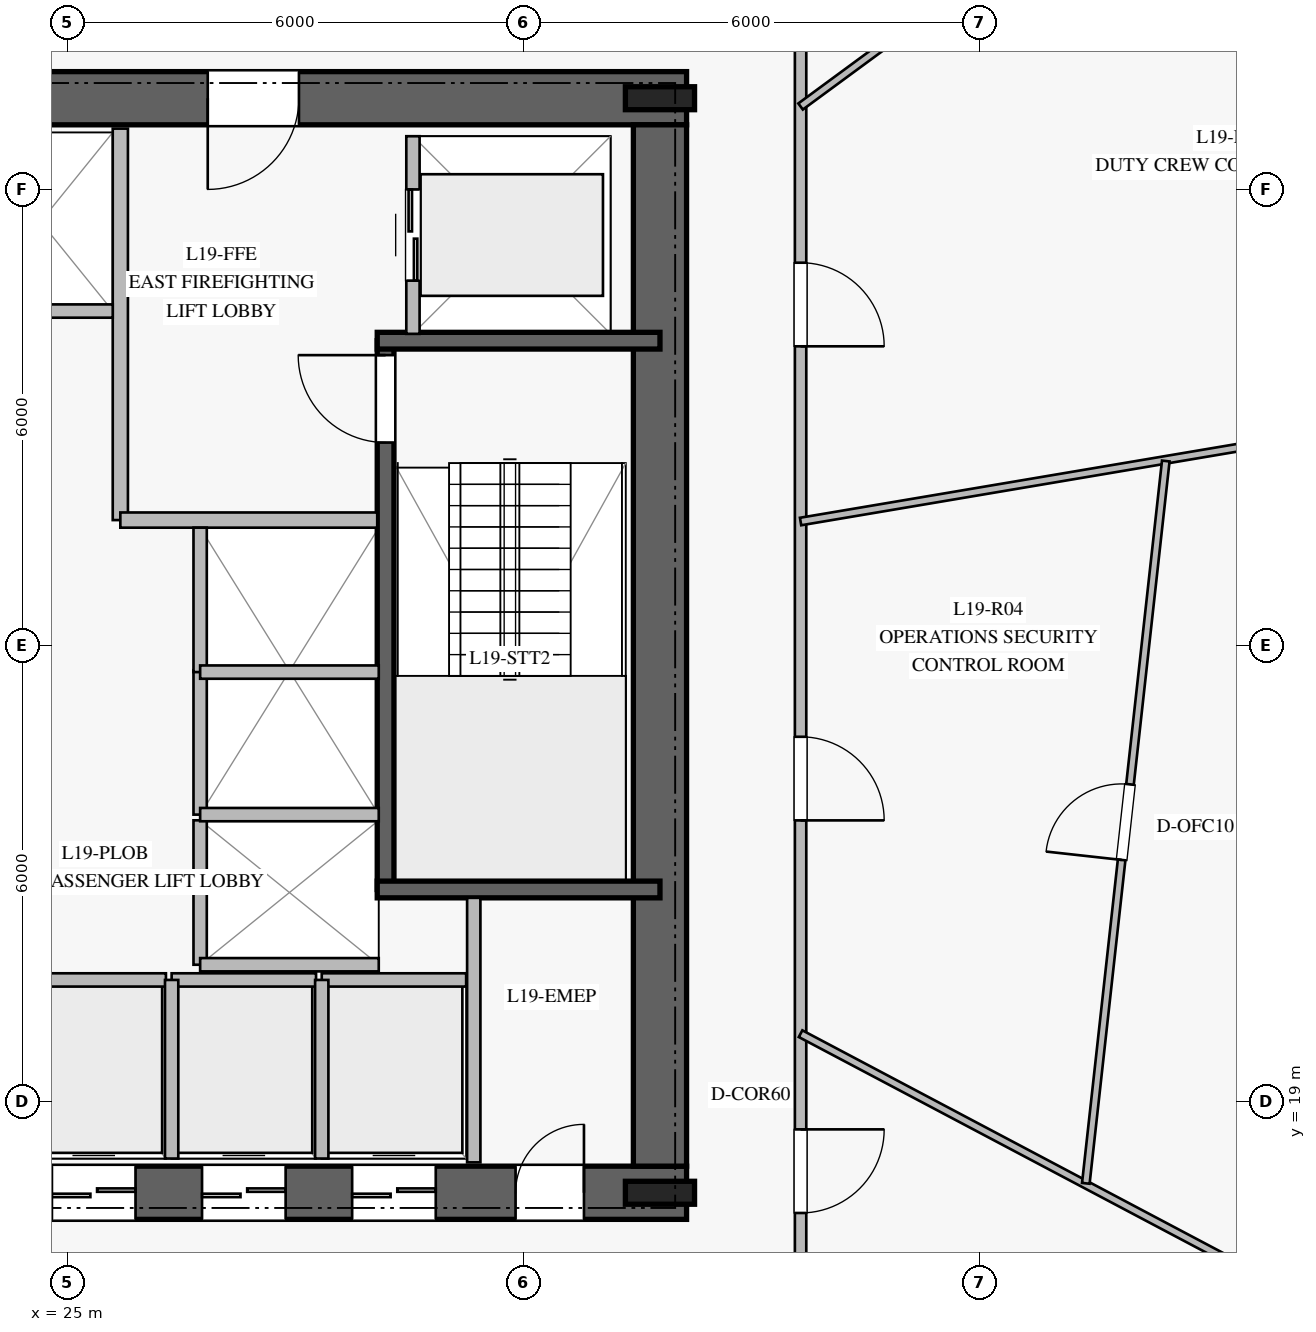
"""IFC4 building model, lengths in metres.
Left out: names, types, materials, properties, quantities, classifications, styles, units other than length and angle.
Written with IfcOpenShell. Run it as: python <this file> out.ifc"""

import sys

from ifc_helpers import new_model, si_unit, direction, frame, frame_2d, origin, origin_2d, place, context, subcontext, project, spatial, rectangle, i_section, extrude, element, fill, save


model = new_model("IFC4")
c1 = context("Model", 3, precision=1e-05, world=origin(), true_north=direction((0.0, 1.0)))
c2 = subcontext(c1, "Body", "Model", "MODEL_VIEW")
j1 = project(units=[si_unit("LENGTHUNIT", "METRE"), si_unit("PLANEANGLEUNIT", "RADIAN")], contexts=[c1])
p1 = place(None, origin())
s1 = spatial("IfcSite", under=j1, at=p1, CompositionType="ELEMENT")
p2 = place(p1, origin())
s2 = spatial("IfcBuilding", under=s1, at=p2, CompositionType="ELEMENT")
p3 = place(p2, frame((0.0, 0.0, 80.0)))
s3 = spatial("IfcBuildingStorey", under=s2, at=p3, CompositionType="ELEMENT", Elevation=80.0)
p4 = place(p3, frame((16.85, 17.8, 0.0), z_axis=(0.0, 0.0, 1.0), x_axis=(1.0, 0.0, 0.0)))
e1 = element("IfcWall", 1, at=p4, inside=s3, PredefinedType="SHEAR", context=c2, shape_type="SweptSolid", body=[
    extrude(rectangle(XDim=16.3, YDim=0.7, at=frame_2d((8.15, 0.0))), origin(), (0.0, 0.0, 1.0), 3.76),
])
p5 = place(p4, frame((5.1, 0.0, 0.0)))
e2 = element("IfcOpeningElement", 2, at=p5, cuts=e1, PredefinedType="OPENING", context=c2, shape_type="SweptSolid", body=[
    extrude(rectangle(XDim=1.2, YDim=2.25, at=frame_2d((0.6, 1.125))), frame((0.0, 0.36, 0.0), z_axis=(0.0, -1.0, 0.0), x_axis=(1.0, 0.0, 0.0)), (0.0, 0.0, 1.0), 0.72),
])
p6 = place(p4, frame((14.05, 0.0, 0.0)))
e3 = element("IfcOpeningElement", 3, at=p6, cuts=e1, PredefinedType="OPENING", context=c2, shape_type="SweptSolid", body=[
    extrude(rectangle(XDim=0.9, YDim=2.1, at=frame_2d((0.45, 1.05))), frame((0.0, 0.36, 0.0), z_axis=(0.0, -1.0, 0.0), x_axis=(1.0, 0.0, 0.0)), (0.0, 0.0, 1.0), 0.72),
])
p7 = place(p4, frame((7.95, 0.0, 0.0)))
e4 = element("IfcOpeningElement", 4, at=p7, cuts=e1, PredefinedType="OPENING", context=c2, shape_type="SweptSolid", body=[
    extrude(rectangle(XDim=1.1, YDim=2.2, at=frame_2d((0.55, 1.1))), frame((0.0, 0.36, 0.0), z_axis=(0.0, -1.0, 0.0), x_axis=(1.0, 0.0, 0.0)), (0.0, 0.0, 1.0), 0.72),
])
p8 = place(p4, frame((9.925, 0.0, 0.0)))
e5 = element("IfcOpeningElement", 5, at=p8, cuts=e1, PredefinedType="OPENING", context=c2, shape_type="SweptSolid", body=[
    extrude(rectangle(XDim=1.1, YDim=2.2, at=frame_2d((0.55, 1.1))), frame((0.0, 0.36, 0.0), z_axis=(0.0, -1.0, 0.0), x_axis=(1.0, 0.0, 0.0)), (0.0, 0.0, 1.0), 0.72),
])
p9 = place(p4, frame((11.9, 0.0, 0.0)))
e6 = element("IfcOpeningElement", 6, at=p9, cuts=e1, PredefinedType="OPENING", context=c2, shape_type="SweptSolid", body=[
    extrude(rectangle(XDim=1.1, YDim=2.2, at=frame_2d((0.55, 1.1))), frame((0.0, 0.36, 0.0), z_axis=(0.0, -1.0, 0.0), x_axis=(1.0, 0.0, 0.0)), (0.0, 0.0, 1.0), 0.72),
])
p10 = place(p3, frame((33.15, 32.2, 0.0), z_axis=(0.0, 0.0, 1.0), x_axis=(-1.0, 0.0, 0.0)))
e7 = element("IfcWall", 7, at=p10, inside=s3, PredefinedType="SHEAR", context=c2, shape_type="SweptSolid", body=[
    extrude(rectangle(XDim=16.3, YDim=0.7, at=frame_2d((8.15, 0.0))), origin(), (0.0, 0.0, 1.0), 3.76),
])
p11 = place(p10, frame((5.1, 0.0, 0.0)))
e8 = element("IfcOpeningElement", 8, at=p11, cuts=e7, PredefinedType="OPENING", context=c2, shape_type="SweptSolid", body=[
    extrude(rectangle(XDim=1.2, YDim=2.25, at=frame_2d((0.6, 1.125))), frame((0.0, 0.36, 0.0), z_axis=(0.0, -1.0, 0.0), x_axis=(1.0, 0.0, 0.0)), (0.0, 0.0, 1.0), 0.72),
])
p12 = place(p3, frame((32.8, 18.15, 0.0), z_axis=(0.0, 0.0, 1.0), x_axis=(0.0, 1.0, 0.0)))
e9 = element("IfcWall", 9, at=p12, inside=s3, PredefinedType="SHEAR", context=c2, shape_type="SweptSolid", body=[
    extrude(rectangle(XDim=13.7, YDim=0.7, at=frame_2d((6.85, 0.0))), origin(), (0.0, 0.0, 1.0), 3.76),
])
for number, where, z_axis, x_axis in (
    (10, (32.8, 17.8, 0.0), (0.0, 0.0, 1.0), (1.0, 0.0, 0.0)),
    (11, (32.8, 32.2, 0.0), (0.0, 0.0, 1.0), (1.0, 0.0, 0.0)),
):
    element("IfcColumn", number, at=place(p3, frame(where, z_axis=z_axis, x_axis=x_axis)), inside=s3, PredefinedType="COLUMN", context=c2, shape_type="SweptSolid", body=[
        extrude(i_section(OverallWidth=0.302, OverallDepth=0.91, WebThickness=0.021, FlangeThickness=0.04, at=origin_2d()), origin(), (0.0, 0.0, 1.0), 4.0),
    ])
p13 = place(p3, frame((29.19, 21.79, 0.0), z_axis=(0.0, 0.0, 1.0), x_axis=(0.0, 1.0, 0.0)))
e12 = element("IfcWall", 12, at=p13, inside=s3, PredefinedType="SOLIDWALL", context=c2, shape_type="SweptSolid", body=[
    extrude(rectangle(XDim=7.22, YDim=0.22, at=frame_2d((3.61, 0.0))), origin(), (0.0, 0.0, 1.0), 3.76),
])
p14 = place(p13, frame((5.88, 0.0, 0.0)))
e13 = element("IfcOpeningElement", 13, at=p14, cuts=e12, PredefinedType="OPENING", context=c2, shape_type="SweptSolid", body=[
    extrude(rectangle(XDim=1.15, YDim=2.2, at=frame_2d((0.575, 1.1))), frame((0.0, 0.12, 0.0), z_axis=(0.0, -1.0, 0.0), x_axis=(1.0, 0.0, 0.0)), (0.0, 0.0, 1.0), 0.24),
])
for number, where, z_axis, x_axis in (
    (14, (29.08, 21.79, 0.0), (0.0, 0.0, 1.0), (1.0, 0.0, 0.0)),
    (15, (29.08, 29.01, 0.0), (0.0, 0.0, 1.0), (1.0, 0.0, 0.0)),
):
    element("IfcWall", number, at=place(p3, frame(where, z_axis=z_axis, x_axis=x_axis)), inside=s3, PredefinedType="SOLIDWALL", context=c2, shape_type="SweptSolid", body=[
        extrude(rectangle(XDim=3.72, YDim=0.22, at=frame_2d((1.86, 0.0))), origin(), (0.0, 0.0, 1.0), 3.76),
    ])
p15 = place(p3, frame((25.7, 26.65, 0.0), z_axis=(0.0, 0.0, 1.0), x_axis=(0.0, 1.0, 0.0)))
e16 = element("IfcWall", 16, at=p15, inside=s3, PredefinedType="PARTITIONING", context=c2, shape_type="SweptSolid", body=[
    extrude(rectangle(XDim=5.15, YDim=0.2, at=frame_2d((2.575, 0.0))), origin(), (0.0, 0.0, 1.0), 3.76),
])
p16 = place(p3, frame((25.7, 26.65, 0.0), z_axis=(0.0, 0.0, 1.0), x_axis=(1.0, 0.0, 0.0)))
e17 = element("IfcWall", 17, at=p16, inside=s3, PredefinedType="PARTITIONING", context=c2, shape_type="SweptSolid", body=[
    extrude(rectangle(XDim=3.38, YDim=0.2, at=frame_2d((1.69, 0.0))), origin(), (0.0, 0.0, 1.0), 3.76),
])
p17 = place(p3, frame((30.35, 18.2, 0.0), z_axis=(0.0, 0.0, 1.0), x_axis=(0.0, 1.0, 0.0)))
e18 = element("IfcWall", 18, at=p17, inside=s3, PredefinedType="PARTITIONING", context=c2, shape_type="SweptSolid", body=[
    extrude(rectangle(XDim=3.48, YDim=0.175, at=frame_2d((1.74, 0.0))), origin(), (0.0, 0.0, 1.0), 3.76),
])
p18 = place(p3, frame((24.4, 20.6, 0.0), z_axis=(0.0, 0.0, 1.0), x_axis=(1.0, 0.0, 0.0)))
e19 = element("IfcWall", 19, at=p18, inside=s3, PredefinedType="PARTITIONING", context=c2, shape_type="SweptSolid", body=[
    extrude(rectangle(XDim=1.9, YDim=0.175, at=frame_2d((0.95, 0.0))), origin(), (0.0, 0.0, 1.0), 3.76),
])
p19 = place(p3, frame((26.375, 20.6, 0.0), z_axis=(0.0, 0.0, 1.0), x_axis=(1.0, 0.0, 0.0)))
e20 = element("IfcWall", 20, at=p19, inside=s3, PredefinedType="PARTITIONING", context=c2, shape_type="SweptSolid", body=[
    extrude(rectangle(XDim=1.9, YDim=0.175, at=frame_2d((0.95, 0.0))), origin(), (0.0, 0.0, 1.0), 3.76),
])
p20 = place(p3, frame((26.375, 18.25, 0.0), z_axis=(0.0, 0.0, 1.0), x_axis=(0.0, 1.0, 0.0)))
e21 = element("IfcWall", 21, at=p20, inside=s3, PredefinedType="PARTITIONING", context=c2, shape_type="SweptSolid", body=[
    extrude(rectangle(XDim=2.35, YDim=0.175, at=frame_2d((1.175, 0.0))), origin(), (0.0, 0.0, 1.0), 3.76),
])
p21 = place(p3, frame((28.35, 20.6, 0.0), z_axis=(0.0, 0.0, 1.0), x_axis=(1.0, 0.0, 0.0)))
e22 = element("IfcWall", 22, at=p21, inside=s3, PredefinedType="PARTITIONING", context=c2, shape_type="SweptSolid", body=[
    extrude(rectangle(XDim=1.9, YDim=0.175, at=frame_2d((0.95, 0.0))), origin(), (0.0, 0.0, 1.0), 3.76),
])
p22 = place(p3, frame((28.35, 18.25, 0.0), z_axis=(0.0, 0.0, 1.0), x_axis=(0.0, 1.0, 0.0)))
e23 = element("IfcWall", 23, at=p22, inside=s3, PredefinedType="PARTITIONING", context=c2, shape_type="SweptSolid", body=[
    extrude(rectangle(XDim=2.35, YDim=0.175, at=frame_2d((1.175, 0.0))), origin(), (0.0, 0.0, 1.0), 3.76),
])
p23 = place(p3, frame((23.7, 29.4, 0.0), z_axis=(0.0, 0.0, 1.0), x_axis=(1.0, 0.0, 0.0)))
e24 = element("IfcWall", 24, at=p23, inside=s3, PredefinedType="PARTITIONING", context=c2, shape_type="SweptSolid", body=[
    extrude(rectangle(XDim=1.9, YDim=0.175, at=frame_2d((0.95, 0.0))), origin(), (0.0, 0.0, 1.0), 3.76),
])
p24 = place(p3, frame((26.75, 20.8, 0.0), z_axis=(0.0, 0.0, 1.0), x_axis=(0.0, 1.0, 0.0)))
e25 = element("IfcWall", 25, at=p24, inside=s3, PredefinedType="PARTITIONING", context=c2, shape_type="SweptSolid", body=[
    extrude(rectangle(XDim=1.9, YDim=0.175, at=frame_2d((0.95, 0.0))), origin(), (0.0, 0.0, 1.0), 3.76),
])
p25 = place(p3, frame((26.75, 20.8, 0.0), z_axis=(0.0, 0.0, 1.0), x_axis=(1.0, 0.0, 0.0)))
e26 = element("IfcWall", 26, at=p25, inside=s3, PredefinedType="PARTITIONING", context=c2, shape_type="SweptSolid", body=[
    extrude(rectangle(XDim=2.35, YDim=0.175, at=frame_2d((1.175, 0.0))), origin(), (0.0, 0.0, 1.0), 3.76),
])
p26 = place(p3, frame((26.75, 22.775, 0.0), z_axis=(0.0, 0.0, 1.0), x_axis=(0.0, 1.0, 0.0)))
e27 = element("IfcWall", 27, at=p26, inside=s3, PredefinedType="PARTITIONING", context=c2, shape_type="SweptSolid", body=[
    extrude(rectangle(XDim=1.9, YDim=0.175, at=frame_2d((0.95, 0.0))), origin(), (0.0, 0.0, 1.0), 3.76),
])
p27 = place(p3, frame((26.75, 22.775, 0.0), z_axis=(0.0, 0.0, 1.0), x_axis=(1.0, 0.0, 0.0)))
e28 = element("IfcWall", 28, at=p27, inside=s3, PredefinedType="PARTITIONING", context=c2, shape_type="SweptSolid", body=[
    extrude(rectangle(XDim=2.35, YDim=0.175, at=frame_2d((1.175, 0.0))), origin(), (0.0, 0.0, 1.0), 3.76),
])
p28 = place(p3, frame((26.75, 24.65, 0.0), z_axis=(0.0, 0.0, 1.0), x_axis=(0.0, 1.0, 0.0)))
e29 = element("IfcWall", 29, at=p28, inside=s3, PredefinedType="PARTITIONING", context=c2, shape_type="SweptSolid", body=[
    extrude(rectangle(XDim=1.9, YDim=0.175, at=frame_2d((0.95, 0.0))), origin(), (0.0, 0.0, 1.0), 3.76),
])
p29 = place(p3, frame((26.75, 24.65, 0.0), z_axis=(0.0, 0.0, 1.0), x_axis=(1.0, 0.0, 0.0)))
e30 = element("IfcWall", 30, at=p29, inside=s3, PredefinedType="PARTITIONING", context=c2, shape_type="SweptSolid", body=[
    extrude(rectangle(XDim=2.35, YDim=0.175, at=frame_2d((1.175, 0.0))), origin(), (0.0, 0.0, 1.0), 3.76),
])
p30 = place(p3, frame((29.55, 29.1, 0.0), z_axis=(0.0, 0.0, 1.0), x_axis=(0.0, 1.0, 0.0)))
e31 = element("IfcWall", 31, at=p30, inside=s3, PredefinedType="PARTITIONING", context=c2, shape_type="SweptSolid", body=[
    extrude(rectangle(XDim=2.6, YDim=0.175, at=frame_2d((1.3, 0.0))), origin(), (0.0, 0.0, 1.0), 3.76),
])
p31 = place(p30, frame((0.7, 0.0, 0.0)))
e32 = element("IfcOpeningElement", 32, at=p31, cuts=e31, PredefinedType="OPENING", context=c2, shape_type="SweptSolid", body=[
    extrude(rectangle(XDim=1.2, YDim=2.2, at=frame_2d((0.6, 1.1))), frame((0.0, 0.098, 0.0), z_axis=(0.0, -1.0, 0.0), x_axis=(1.0, 0.0, 0.0)), (0.0, 0.0, 1.0), 0.195),
])
p32 = place(p3, frame((34.65, 34.05, 0.0), z_axis=(0.0, 0.0, 1.0), x_axis=(0.0, -1.0, 0.0)))
e33 = element("IfcWall", 33, at=p32, inside=s3, PredefinedType="PARTITIONING", context=c2, shape_type="SweptSolid", body=[
    extrude(rectangle(XDim=18.1, YDim=0.15, at=frame_2d((9.05, 0.0))), origin(), (0.0, 0.0, 1.0), 3.21),
])
p33 = place(p32, frame((15.416, 0.0, 0.0)))
e34 = element("IfcOpeningElement", 34, at=p33, cuts=e33, PredefinedType="OPENING", context=c2, shape_type="SweptSolid", body=[
    extrude(rectangle(XDim=1.1, YDim=2.2, at=frame_2d((0.55, 1.1))), frame((0.0, 0.085, 0.0), z_axis=(0.0, -1.0, 0.0), x_axis=(1.0, 0.0, 0.0)), (0.0, 0.0, 1.0), 0.17),
])
p34 = place(p32, frame((10.251, 0.0, 0.0)))
e35 = element("IfcOpeningElement", 35, at=p34, cuts=e33, PredefinedType="OPENING", context=c2, shape_type="SweptSolid", body=[
    extrude(rectangle(XDim=1.1, YDim=2.2, at=frame_2d((0.55, 1.1))), frame((0.0, 0.085, 0.0), z_axis=(0.0, -1.0, 0.0), x_axis=(1.0, 0.0, 0.0)), (0.0, 0.0, 1.0), 0.17),
])
p35 = place(p32, frame((4.014, 0.0, 0.0)))
e36 = element("IfcOpeningElement", 36, at=p35, cuts=e33, PredefinedType="OPENING", context=c2, shape_type="SweptSolid", body=[
    extrude(rectangle(XDim=1.1, YDim=2.2, at=frame_2d((0.55, 1.1))), frame((0.0, 0.085, 0.0), z_axis=(0.0, -1.0, 0.0), x_axis=(1.0, 0.0, 0.0)), (0.0, 0.0, 1.0), 0.17),
])
p36 = place(p3, frame((34.65, 32.091, 0.0), z_axis=(0.0, 0.0, 1.0), x_axis=(0.805812397502, 0.592170904412, 0.0)))
e37 = element("IfcWall", 37, at=p36, inside=s3, PredefinedType="MOVABLE", context=c2, shape_type="SweptSolid", body=[
    extrude(rectangle(XDim=9.83, YDim=0.1, at=frame_2d((4.915, 0.0))), origin(), (0.0, 0.0, 1.0), 3.05),
])
p37 = place(p3, frame((34.65, 19.893, 0.0), z_axis=(0.0, 0.0, 1.0), x_axis=(0.883895590045, -0.467684280149, 0.0)))
e38 = element("IfcWall", 38, at=p37, inside=s3, PredefinedType="MOVABLE", context=c2, shape_type="SweptSolid", body=[
    extrude(rectangle(XDim=11.194, YDim=0.1, at=frame_2d((5.597, 0.0))), origin(), (0.0, 0.0, 1.0), 3.06),
])
p38 = place(p3, frame((34.65, 26.631, 0.0), z_axis=(0.0, 0.0, 1.0), x_axis=(0.986036061015, 0.16653193801, 0.0)))
e39 = element("IfcWall", 39, at=p38, inside=s3, PredefinedType="MOVABLE", context=c2, shape_type="SweptSolid", body=[
    extrude(rectangle(XDim=13.918, YDim=0.1, at=frame_2d((6.959, 0.0))), origin(), (0.0, 0.0, 1.0), 3.06),
])
p39 = place(p3, frame((38.403, 17.924, 0.0), z_axis=(0.0, 0.0, 1.0), x_axis=(0.110030740607, 0.99392818459, 0.0)))
e40 = element("IfcWall", 40, at=p39, inside=s3, PredefinedType="MOVABLE", context=c2, shape_type="SweptSolid", body=[
    extrude(rectangle(XDim=9.561, YDim=0.1, at=frame_2d((4.781, 0.0))), origin(), (0.0, 0.0, 1.0), 3.76),
])
p40 = place(p39, frame((4.281, 0.0, 0.0)))
e41 = element("IfcOpeningElement", 41, at=p40, cuts=e40, PredefinedType="OPENING", context=c2, shape_type="SweptSolid", body=[
    extrude(rectangle(XDim=1.0, YDim=2.15, at=frame_2d((0.5, 1.075))), frame((0.0, 0.06, 0.0), z_axis=(0.0, -1.0, 0.0), x_axis=(1.0, 0.0, 0.0)), (0.0, 0.0, 1.0), 0.12),
])
p41 = place(p14, origin())
e42 = element("IfcDoor", 42, at=p41, inside=s3, OperationType="SINGLE_SWING_RIGHT", PredefinedType="DOOR", context=c2, shape_type="SweptSolid", body=[
    extrude(rectangle(XDim=1.15, YDim=2.2, at=frame_2d((0.575, 1.1))), frame((0.0, 0.025, 0.0), z_axis=(0.0, -1.0, 0.0), x_axis=(1.0, 0.0, 0.0)), (0.0, 0.0, 1.0), 0.05),
])
fill(e13, e42)
p42 = place(p11, origin())
e43 = element("IfcDoor", 43, at=p42, inside=s3, OperationType="SINGLE_SWING_RIGHT", PredefinedType="DOOR", context=c2, shape_type="SweptSolid", body=[
    extrude(rectangle(XDim=1.2, YDim=2.25, at=frame_2d((0.6, 1.125))), frame((0.0, 0.025, 0.0), z_axis=(0.0, -1.0, 0.0), x_axis=(1.0, 0.0, 0.0)), (0.0, 0.0, 1.0), 0.05),
])
fill(e8, e43)
p43 = place(p6, origin())
e44 = element("IfcDoor", 44, at=p43, inside=s3, OperationType="SINGLE_SWING_RIGHT", PredefinedType="DOOR", context=c2, shape_type="SweptSolid", body=[
    extrude(rectangle(XDim=0.9, YDim=2.1, at=frame_2d((0.45, 1.05))), frame((0.0, 0.025, 0.0), z_axis=(0.0, -1.0, 0.0), x_axis=(1.0, 0.0, 0.0)), (0.0, 0.0, 1.0), 0.05),
])
fill(e3, e44)
p44 = place(p7, origin())
e45 = element("IfcDoor", 45, at=p44, inside=s3, OperationType="DOUBLE_DOOR_SLIDING", PredefinedType="DOOR", context=c2, shape_type="SweptSolid", body=[
    extrude(rectangle(XDim=1.1, YDim=2.2, at=frame_2d((0.55, 1.1))), frame((0.0, 0.025, 0.0), z_axis=(0.0, -1.0, 0.0), x_axis=(1.0, 0.0, 0.0)), (0.0, 0.0, 1.0), 0.05),
])
fill(e4, e45)
p45 = place(p8, origin())
e46 = element("IfcDoor", 46, at=p45, inside=s3, OperationType="DOUBLE_DOOR_SLIDING", PredefinedType="DOOR", context=c2, shape_type="SweptSolid", body=[
    extrude(rectangle(XDim=1.1, YDim=2.2, at=frame_2d((0.55, 1.1))), frame((0.0, 0.025, 0.0), z_axis=(0.0, -1.0, 0.0), x_axis=(1.0, 0.0, 0.0)), (0.0, 0.0, 1.0), 0.05),
])
fill(e5, e46)
p46 = place(p9, origin())
e47 = element("IfcDoor", 47, at=p46, inside=s3, OperationType="DOUBLE_DOOR_SLIDING", PredefinedType="DOOR", context=c2, shape_type="SweptSolid", body=[
    extrude(rectangle(XDim=1.1, YDim=2.2, at=frame_2d((0.55, 1.1))), frame((0.0, 0.025, 0.0), z_axis=(0.0, -1.0, 0.0), x_axis=(1.0, 0.0, 0.0)), (0.0, 0.0, 1.0), 0.05),
])
fill(e6, e47)
p47 = place(p31, origin())
e48 = element("IfcDoor", 48, at=p47, inside=s3, OperationType="DOUBLE_DOOR_SLIDING", PredefinedType="DOOR", context=c2, shape_type="SweptSolid", body=[
    extrude(rectangle(XDim=1.2, YDim=2.2, at=frame_2d((0.6, 1.1))), frame((0.0, 0.025, 0.0), z_axis=(0.0, -1.0, 0.0), x_axis=(1.0, 0.0, 0.0)), (0.0, 0.0, 1.0), 0.05),
])
fill(e32, e48)
p48 = place(p33, origin())
e49 = element("IfcDoor", 49, at=p48, inside=s3, OperationType="SINGLE_SWING_LEFT", PredefinedType="DOOR", context=c2, shape_type="SweptSolid", body=[
    extrude(rectangle(XDim=1.1, YDim=2.2, at=frame_2d((0.55, 1.1))), frame((0.0, 0.025, 0.0), z_axis=(0.0, -1.0, 0.0), x_axis=(1.0, 0.0, 0.0)), (0.0, 0.0, 1.0), 0.05),
])
fill(e34, e49)
p49 = place(p34, origin())
e50 = element("IfcDoor", 50, at=p49, inside=s3, OperationType="SINGLE_SWING_RIGHT", PredefinedType="DOOR", context=c2, shape_type="SweptSolid", body=[
    extrude(rectangle(XDim=1.1, YDim=2.2, at=frame_2d((0.55, 1.1))), frame((0.0, 0.025, 0.0), z_axis=(0.0, -1.0, 0.0), x_axis=(1.0, 0.0, 0.0)), (0.0, 0.0, 1.0), 0.05),
])
fill(e35, e50)
p50 = place(p40, origin())
e51 = element("IfcDoor", 51, at=p50, inside=s3, OperationType="SINGLE_SWING_LEFT", PredefinedType="DOOR", context=c2, shape_type="SweptSolid", body=[
    extrude(rectangle(XDim=1.0, YDim=2.15, at=frame_2d((0.5, 1.075))), frame((0.0, 0.025, 0.0), z_axis=(0.0, -1.0, 0.0), x_axis=(1.0, 0.0, 0.0)), (0.0, 0.0, 1.0), 0.05),
])
fill(e41, e51)
p51 = place(p35, origin())
e52 = element("IfcDoor", 52, at=p51, inside=s3, OperationType="SINGLE_SWING_RIGHT", PredefinedType="DOOR", context=c2, shape_type="SweptSolid", body=[
    extrude(rectangle(XDim=1.1, YDim=2.2, at=frame_2d((0.55, 1.1))), frame((0.0, 0.025, 0.0), z_axis=(0.0, -1.0, 0.0), x_axis=(1.0, 0.0, 0.0)), (0.0, 0.0, 1.0), 0.05),
])
fill(e36, e52)
save(model, sys.argv[1])
